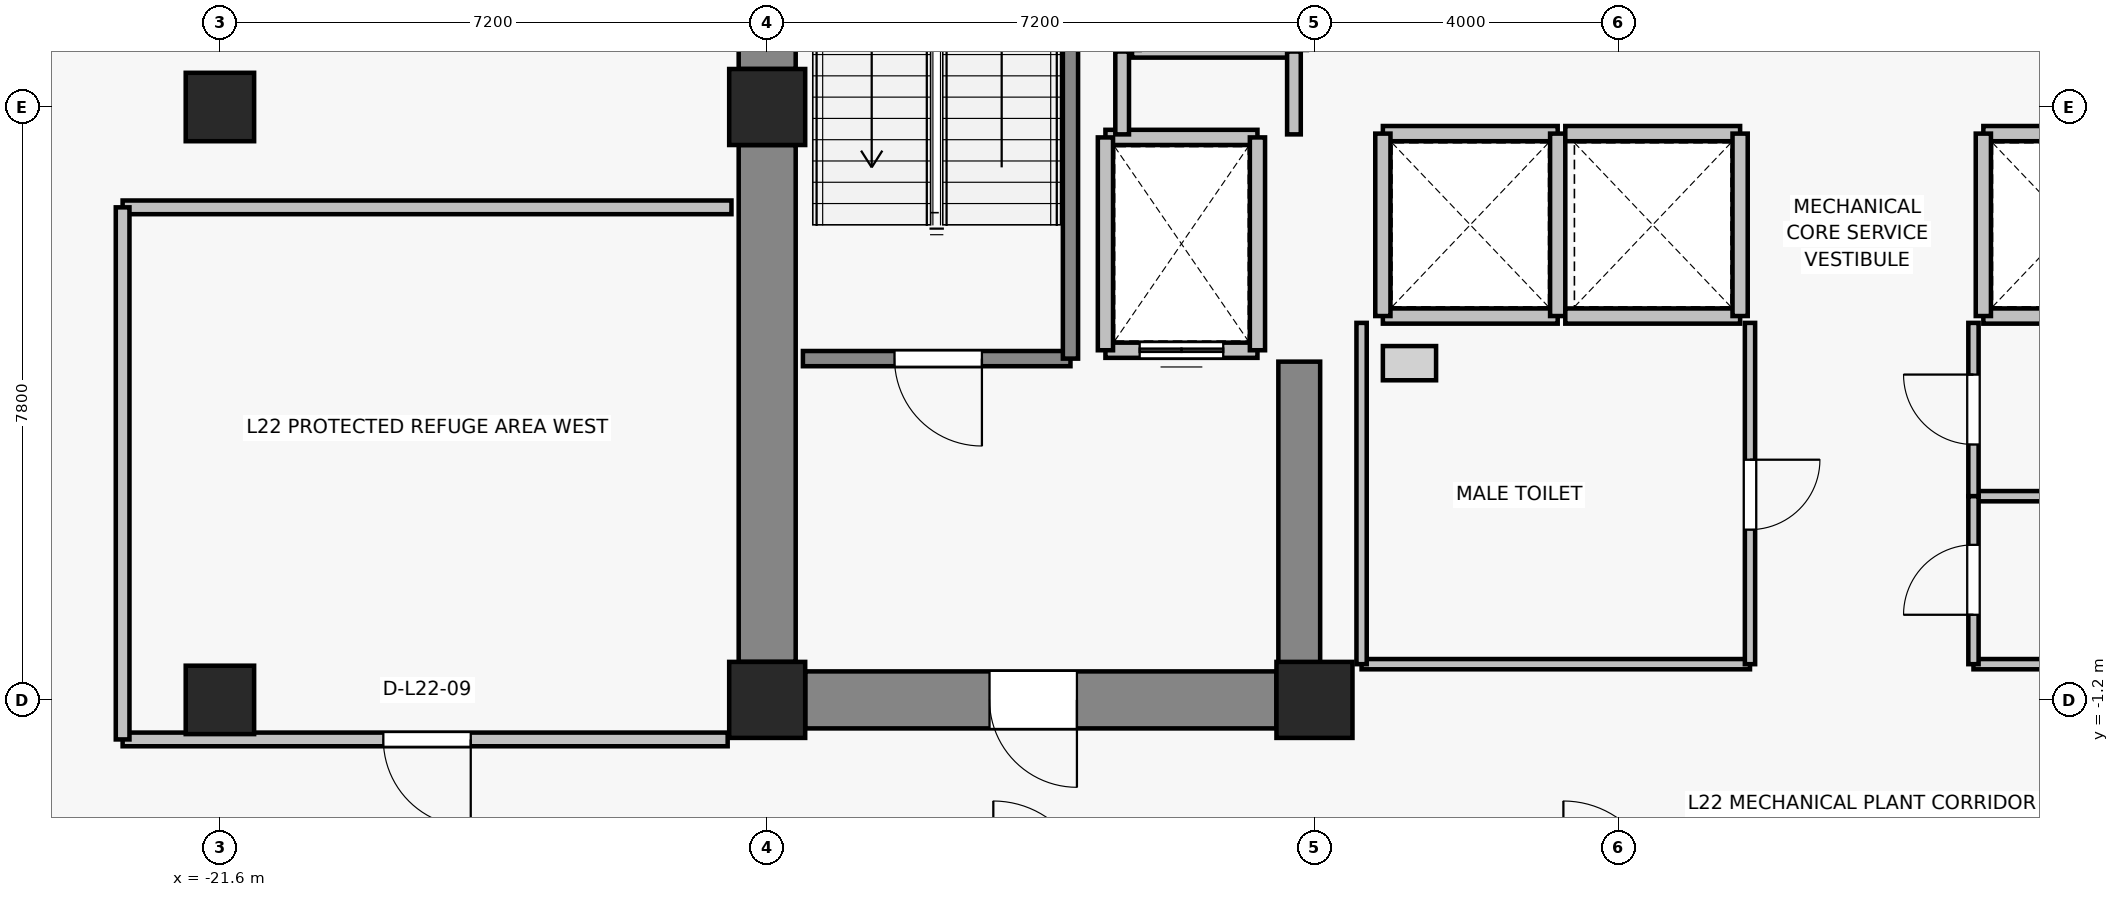
"""IFC4 building model, lengths in metres.
Left out: names, types, materials, properties, quantities, classifications, styles, units other than length and angle.
Written with IfcOpenShell. Run it as: python <this file> out.ifc"""

import sys

from ifc_helpers import new_model, si_unit, direction, frame, frame_2d, origin, origin_2d, place, context, subcontext, project, spatial, rectangle, extrude, source, transform, mapped, element, fill, save


model = new_model("IFC4")
c1 = context("Model", 3, precision=1e-05, world=origin(), true_north=direction((0.0, 1.0)))
c2 = subcontext(c1, "Body", "Model", "MODEL_VIEW")
j1 = project(units=[si_unit("LENGTHUNIT", "METRE"), si_unit("PLANEANGLEUNIT", "RADIAN")], contexts=[c1])
p1 = place(None, origin())
s1 = spatial("IfcSite", under=j1, at=p1, CompositionType="ELEMENT")
p2 = place(p1, origin())
s2 = spatial("IfcBuilding", under=s1, at=p2, CompositionType="ELEMENT")
p3 = place(p2, frame((0.0, 0.0, 80.2)))
s3 = spatial("IfcBuildingStorey", under=s2, at=p3, CompositionType="ELEMENT", Elevation=80.2)
for number, where, z_axis, x_axis in (
    (1, (-14.4, -1.2, 0.0), (0.0, 0.0, 1.0), (1.0, 0.0, 0.0)),
    (2, (-7.2, -1.2, 0.0), (0.0, 0.0, 1.0), (1.0, 0.0, 0.0)),
    (3, (-14.4, 6.6, 0.0), (0.0, 0.0, 1.0), (1.0, 0.0, 0.0)),
):
    element("IfcColumn", number, at=place(p3, frame(where, z_axis=z_axis, x_axis=x_axis)), inside=s3, PredefinedType="COLUMN", context=c2, shape_type="SweptSolid", body=[
        extrude(rectangle(XDim=1.0, YDim=1.0, at=origin_2d()), origin(), (0.0, 0.0, 1.0), 6.6),
    ])
for number, where, z_axis, x_axis in (
    (4, (-21.6, -1.2, 0.0), (0.0, 0.0, 1.0), (1.0, 0.0, 0.0)),
    (5, (-21.6, 6.6, 0.0), (0.0, 0.0, 1.0), (1.0, 0.0, 0.0)),
):
    element("IfcColumn", number, at=place(p3, frame(where, z_axis=z_axis, x_axis=x_axis)), inside=s3, PredefinedType="COLUMN", context=c2, shape_type="SweptSolid", body=[
        extrude(rectangle(XDim=0.9, YDim=0.9, at=origin_2d()), origin(), (0.0, 0.0, 1.0), 6.6),
    ])
p4 = place(p3, frame((-14.4, -0.7, 0.0), z_axis=(0.0, 0.0, 1.0), x_axis=(0.0, 1.0, 0.0)))
e6 = element("IfcWall", 6, at=p4, inside=s3, PredefinedType="SHEAR", context=c2, shape_type="SweptSolid", body=[
    extrude(rectangle(XDim=6.8, YDim=0.75, at=frame_2d((3.4, 0.0))), origin(), (0.0, 0.0, 1.0), 6.35),
])
p5 = place(p3, frame((-14.4, 7.1, 0.0), z_axis=(0.0, 0.0, 1.0), x_axis=(0.0, 1.0, 0.0)))
e7 = element("IfcWall", 7, at=p5, inside=s3, PredefinedType="SHEAR", context=c2, shape_type="SweptSolid", body=[
    extrude(rectangle(XDim=5.9, YDim=0.75, at=frame_2d((2.95, 0.0))), origin(), (0.0, 0.0, 1.0), 6.35),
])
p6 = place(p3, frame((-7.7, -1.2, 0.0), z_axis=(0.0, 0.0, 1.0), x_axis=(-1.0, 0.0, 0.0)))
e8 = element("IfcWall", 8, at=p6, inside=s3, PredefinedType="SHEAR", context=c2, shape_type="SweptSolid", body=[
    extrude(rectangle(XDim=6.2, YDim=0.75, at=frame_2d((3.1, 0.0))), origin(), (0.0, 0.0, 1.0), 6.35),
])
p7 = place(p6, frame((2.625, 0.0, 0.0)))
e9 = element("IfcOpeningElement", 9, at=p7, cuts=e8, PredefinedType="OPENING", context=c2, shape_type="SweptSolid", body=[
    extrude(rectangle(XDim=1.15, YDim=2.15, at=frame_2d((0.575, 1.075))), frame((0.0, 0.385, 0.0), z_axis=(0.0, -1.0, 0.0), x_axis=(1.0, 0.0, 0.0)), (0.0, 0.0, 1.0), 0.77),
])
p8 = place(p3, frame((-7.4, -0.825, 0.0), z_axis=(0.0, 0.0, 1.0), x_axis=(0.0, 1.0, 0.0)))
e10 = element("IfcWall", 10, at=p8, inside=s3, PredefinedType="SHEAR", context=c2, shape_type="SweptSolid", body=[
    extrude(rectangle(XDim=4.075, YDim=0.55, at=frame_2d((2.038, 0.0))), origin(), (0.0, 0.0, 1.0), 6.35),
])
p9 = place(p3, frame((-7.95, 3.4, 0.0), z_axis=(0.0, 0.0, 1.0), x_axis=(-1.0, 0.0, 0.0)))
e11 = element("IfcWall", 11, at=p9, inside=s3, PredefinedType="SOLIDWALL", context=c2, shape_type="SweptSolid", body=[
    extrude(rectangle(XDim=2.0, YDim=0.2, at=frame_2d((1.0, 0.0))), origin(), (0.0, 0.0, 1.0), 6.35),
])
p10 = place(p9, frame((0.45, 0.0, 0.0)))
e12 = element("IfcOpeningElement", 12, at=p10, cuts=e11, PredefinedType="OPENING", context=c2, shape_type="SweptSolid", body=[
    extrude(rectangle(XDim=1.1, YDim=2.2, at=frame_2d((0.55, 1.1))), frame((0.0, 0.11, 0.0), z_axis=(0.0, -1.0, 0.0), x_axis=(1.0, 0.0, 0.0)), (0.0, 0.0, 1.0), 0.22),
])
p11 = place(p3, frame((-9.95, 6.2, 0.0), z_axis=(0.0, 0.0, 1.0), x_axis=(1.0, 0.0, 0.0)))
e13 = element("IfcWall", 13, at=p11, inside=s3, PredefinedType="SOLIDWALL", context=c2, shape_type="SweptSolid", body=[
    extrude(rectangle(XDim=2.0, YDim=0.2, at=frame_2d((1.0, 0.0))), origin(), (0.0, 0.0, 1.0), 6.35),
])
for number, where, z_axis, x_axis in (
    (14, (-9.95, 3.4, 0.0), (0.0, 0.0, 1.0), (0.0, 1.0, 0.0)),
    (15, (-7.95, 6.2, 0.0), (0.0, 0.0, 1.0), (0.0, -1.0, 0.0)),
):
    element("IfcWall", number, at=place(p3, frame(where, z_axis=z_axis, x_axis=x_axis)), inside=s3, PredefinedType="SOLIDWALL", context=c2, shape_type="SweptSolid", body=[
        extrude(rectangle(XDim=2.8, YDim=0.2, at=frame_2d((1.4, 0.0))), origin(), (0.0, 0.0, 1.0), 6.35),
    ])
for number, where, z_axis, x_axis in (
    (16, (-4.0, 3.85, 0.0), (0.0, 0.0, 1.0), (-1.0, 0.0, 0.0)),
    (17, (-6.3, 6.25, 0.0), (0.0, 0.0, 1.0), (1.0, 0.0, 0.0)),
):
    element("IfcWall", number, at=place(p3, frame(where, z_axis=z_axis, x_axis=x_axis)), inside=s3, PredefinedType="SOLIDWALL", context=c2, shape_type="SweptSolid", body=[
        extrude(rectangle(XDim=2.3, YDim=0.2, at=frame_2d((1.15, 0.0))), origin(), (0.0, 0.0, 1.0), 6.35),
    ])
for number, where, z_axis, x_axis in (
    (18, (-6.3, 3.85, 0.0), (0.0, 0.0, 1.0), (0.0, 1.0, 0.0)),
    (19, (-4.0, 6.25, 0.0), (0.0, 0.0, 1.0), (0.0, -1.0, 0.0)),
):
    element("IfcWall", number, at=place(p3, frame(where, z_axis=z_axis, x_axis=x_axis)), inside=s3, PredefinedType="SOLIDWALL", context=c2, shape_type="SweptSolid", body=[
        extrude(rectangle(XDim=2.4, YDim=0.2, at=frame_2d((1.2, 0.0))), origin(), (0.0, 0.0, 1.0), 6.35),
    ])
for number, where, z_axis, x_axis in (
    (20, (-1.6, 3.85, 0.0), (0.0, 0.0, 1.0), (-1.0, 0.0, 0.0)),
    (21, (-3.9, 6.25, 0.0), (0.0, 0.0, 1.0), (1.0, 0.0, 0.0)),
):
    element("IfcWall", number, at=place(p3, frame(where, z_axis=z_axis, x_axis=x_axis)), inside=s3, PredefinedType="SOLIDWALL", context=c2, shape_type="SweptSolid", body=[
        extrude(rectangle(XDim=2.3, YDim=0.2, at=frame_2d((1.15, 0.0))), origin(), (0.0, 0.0, 1.0), 6.35),
    ])
p12 = place(p3, frame((-1.6, 6.25, 0.0), z_axis=(0.0, 0.0, 1.0), x_axis=(0.0, -1.0, 0.0)))
e22 = element("IfcWall", 22, at=p12, inside=s3, PredefinedType="SOLIDWALL", context=c2, shape_type="SweptSolid", body=[
    extrude(rectangle(XDim=2.4, YDim=0.2, at=frame_2d((1.2, 0.0))), origin(), (0.0, 0.0, 1.0), 6.35),
])
for number, where, z_axis, x_axis in (
    (23, (3.9, 3.85, 0.0), (0.0, 0.0, 1.0), (-1.0, 0.0, 0.0)),
    (24, (1.6, 6.25, 0.0), (0.0, 0.0, 1.0), (1.0, 0.0, 0.0)),
):
    element("IfcWall", number, at=place(p3, frame(where, z_axis=z_axis, x_axis=x_axis)), inside=s3, PredefinedType="SOLIDWALL", context=c2, shape_type="SweptSolid", body=[
        extrude(rectangle(XDim=2.3, YDim=0.2, at=frame_2d((1.15, 0.0))), origin(), (0.0, 0.0, 1.0), 6.35),
    ])
p13 = place(p3, frame((1.6, 3.85, 0.0), z_axis=(0.0, 0.0, 1.0), x_axis=(0.0, 1.0, 0.0)))
e25 = element("IfcWall", 25, at=p13, inside=s3, PredefinedType="SOLIDWALL", context=c2, shape_type="SweptSolid", body=[
    extrude(rectangle(XDim=2.4, YDim=0.2, at=frame_2d((1.2, 0.0))), origin(), (0.0, 0.0, 1.0), 6.35),
])
p14 = place(p3, frame((-7.4, 7.35, 0.0), z_axis=(0.0, 0.0, 1.0), x_axis=(-1.0, 0.0, 0.0)))
e26 = element("IfcWall", 26, at=p14, inside=s3, PredefinedType="SOLIDWALL", context=c2, shape_type="SweptSolid", body=[
    extrude(rectangle(XDim=2.2, YDim=0.2, at=frame_2d((1.1, 0.0))), origin(), (0.0, 0.0, 1.0), 5.79),
])
p15 = place(p3, frame((-10.41, 3.29, 0.0), z_axis=(0.0, 0.0, 1.0), x_axis=(-1.0, 0.0, 0.0)))
e27 = element("IfcWall", 27, at=p15, inside=s3, PredefinedType="SOLIDWALL", context=c2, shape_type="SweptSolid", body=[
    extrude(rectangle(XDim=3.52, YDim=0.2, at=frame_2d((1.76, 0.0))), origin(), (0.0, 0.0, 1.0), 6.35),
])
p16 = place(p15, frame((1.165, 0.0, 0.0)))
e28 = element("IfcOpeningElement", 28, at=p16, cuts=e27, PredefinedType="OPENING", context=c2, shape_type="SweptSolid", body=[
    extrude(rectangle(XDim=1.15, YDim=2.15, at=frame_2d((0.575, 1.075))), frame((0.0, 0.11, 0.0), z_axis=(0.0, -1.0, 0.0), x_axis=(1.0, 0.0, 0.0)), (0.0, 0.0, 1.0), 0.22),
])
p17 = place(p3, frame((-10.41, 12.13, 0.0), z_axis=(0.0, 0.0, 1.0), x_axis=(0.0, -1.0, 0.0)))
e29 = element("IfcWall", 29, at=p17, inside=s3, PredefinedType="SOLIDWALL", context=c2, shape_type="SweptSolid", body=[
    extrude(rectangle(XDim=8.84, YDim=0.2, at=frame_2d((4.42, 0.0))), origin(), (0.0, 0.0, 1.0), 6.35),
])
p18 = place(p3, frame((-9.73, 6.24, 0.0), z_axis=(0.0, 0.0, 1.0), x_axis=(0.0, 1.0, 0.0)))
e30 = element("IfcWall", 30, at=p18, inside=s3, PredefinedType="PARTITIONING", context=c2, shape_type="SweptSolid", body=[
    extrude(rectangle(XDim=1.09, YDim=0.18, at=frame_2d((0.545, 0.0))), origin(), (0.0, 0.0, 1.0), 6.35),
])
p19 = place(p3, frame((-7.47, 7.33, 0.0), z_axis=(0.0, 0.0, 1.0), x_axis=(0.0, -1.0, 0.0)))
e31 = element("IfcWall", 31, at=p19, inside=s3, PredefinedType="PARTITIONING", context=c2, shape_type="SweptSolid", body=[
    extrude(rectangle(XDim=1.09, YDim=0.18, at=frame_2d((0.545, 0.0))), origin(), (0.0, 0.0, 1.0), 5.79),
])
p20 = place(p3, frame((-1.47, -0.73, 0.0), z_axis=(0.0, 0.0, 1.0), x_axis=(-1.0, 0.0, 0.0)))
e32 = element("IfcWall", 32, at=p20, inside=s3, PredefinedType="PARTITIONING", context=c2, shape_type="SweptSolid", body=[
    extrude(rectangle(XDim=5.11, YDim=0.135, at=frame_2d((2.555, 0.0))), origin(), (0.0, 0.0, 1.0), 6.35),
])
p21 = place(p3, frame((-6.58, -0.73, 0.0), z_axis=(0.0, 0.0, 1.0), x_axis=(0.0, 1.0, 0.0)))
e33 = element("IfcWall", 33, at=p21, inside=s3, PredefinedType="PARTITIONING", context=c2, shape_type="SweptSolid", body=[
    extrude(rectangle(XDim=4.49, YDim=0.135, at=frame_2d((2.245, 0.0))), origin(), (0.0, 0.0, 1.0), 6.35),
])
p22 = place(p3, frame((-1.47, 3.76, 0.0), z_axis=(0.0, 0.0, 1.0), x_axis=(0.0, -1.0, 0.0)))
e34 = element("IfcWall", 34, at=p22, inside=s3, PredefinedType="PARTITIONING", context=c2, shape_type="SweptSolid", body=[
    extrude(rectangle(XDim=4.49, YDim=0.135, at=frame_2d((2.245, 0.0))), origin(), (0.0, 0.0, 1.0), 6.35),
])
p23 = place(p22, frame((1.8, 0.0, 0.0)))
e35 = element("IfcOpeningElement", 35, at=p23, cuts=e34, PredefinedType="OPENING", context=c2, shape_type="SweptSolid", body=[
    extrude(rectangle(XDim=0.92, YDim=2.1, at=frame_2d((0.46, 1.05))), frame((0.0, 0.077, 0.0), z_axis=(0.0, -1.0, 0.0), x_axis=(1.0, 0.0, 0.0)), (0.0, 0.0, 1.0), 0.155),
])
p24 = place(p3, frame((6.58, 1.48, 0.0), z_axis=(0.0, 0.0, 1.0), x_axis=(-1.0, 0.0, 0.0)))
e36 = element("IfcWall", 36, at=p24, inside=s3, PredefinedType="PARTITIONING", context=c2, shape_type="SweptSolid", body=[
    extrude(rectangle(XDim=5.11, YDim=0.135, at=frame_2d((2.555, 0.0))), origin(), (0.0, 0.0, 1.0), 6.35),
])
p25 = place(p3, frame((1.47, 1.48, 0.0), z_axis=(0.0, 0.0, 1.0), x_axis=(0.0, 1.0, 0.0)))
e37 = element("IfcWall", 37, at=p25, inside=s3, PredefinedType="PARTITIONING", context=c2, shape_type="SweptSolid", body=[
    extrude(rectangle(XDim=2.28, YDim=0.135, at=frame_2d((1.14, 0.0))), origin(), (0.0, 0.0, 1.0), 6.35),
])
p26 = place(p25, frame((0.68, 0.0, 0.0)))
e38 = element("IfcOpeningElement", 38, at=p26, cuts=e37, PredefinedType="OPENING", context=c2, shape_type="SweptSolid", body=[
    extrude(rectangle(XDim=0.92, YDim=2.1, at=frame_2d((0.46, 1.05))), frame((0.0, 0.077, 0.0), z_axis=(0.0, -1.0, 0.0), x_axis=(1.0, 0.0, 0.0)), (0.0, 0.0, 1.0), 0.155),
])
p27 = place(p3, frame((4.18, -0.73, 0.0), z_axis=(0.0, 0.0, 1.0), x_axis=(-1.0, 0.0, 0.0)))
e39 = element("IfcWall", 39, at=p27, inside=s3, PredefinedType="PARTITIONING", context=c2, shape_type="SweptSolid", body=[
    extrude(rectangle(XDim=2.71, YDim=0.135, at=frame_2d((1.355, 0.0))), origin(), (0.0, 0.0, 1.0), 6.35),
])
p28 = place(p3, frame((1.47, -0.73, 0.0), z_axis=(0.0, 0.0, 1.0), x_axis=(0.0, 1.0, 0.0)))
e40 = element("IfcWall", 40, at=p28, inside=s3, PredefinedType="PARTITIONING", context=c2, shape_type="SweptSolid", body=[
    extrude(rectangle(XDim=2.21, YDim=0.135, at=frame_2d((1.105, 0.0))), origin(), (0.0, 0.0, 1.0), 6.35),
])
p29 = place(p28, frame((0.65, 0.0, 0.0)))
e41 = element("IfcOpeningElement", 41, at=p29, cuts=e40, PredefinedType="OPENING", context=c2, shape_type="SweptSolid", body=[
    extrude(rectangle(XDim=0.92, YDim=2.1, at=frame_2d((0.46, 1.05))), frame((0.0, 0.077, 0.0), z_axis=(0.0, -1.0, 0.0), x_axis=(1.0, 0.0, 0.0)), (0.0, 0.0, 1.0), 0.155),
])
p30 = place(p3, frame((-14.92, -1.72, 0.0), z_axis=(0.0, 0.0, 1.0), x_axis=(-1.0, 0.0, 0.0)))
e42 = element("IfcWall", 42, at=p30, inside=s3, PredefinedType="PARTITIONING", context=c2, shape_type="SweptSolid", body=[
    extrude(rectangle(XDim=7.96, YDim=0.18, at=frame_2d((3.98, 0.0))), origin(), (0.0, 0.0, 1.0), 5.79),
])
p31 = place(p30, frame((3.38, 0.0, 0.0)))
e43 = element("IfcOpeningElement", 43, at=p31, cuts=e42, PredefinedType="OPENING", context=c2, shape_type="SweptSolid", body=[
    extrude(rectangle(XDim=1.15, YDim=2.15, at=frame_2d((0.575, 1.075))), frame((0.0, 0.1, 0.0), z_axis=(0.0, -1.0, 0.0), x_axis=(1.0, 0.0, 0.0)), (0.0, 0.0, 1.0), 0.2),
])
p32 = place(p3, frame((-22.88, 5.28, 0.0), z_axis=(0.0, 0.0, 1.0), x_axis=(1.0, 0.0, 0.0)))
e44 = element("IfcWall", 44, at=p32, inside=s3, PredefinedType="PARTITIONING", context=c2, shape_type="SweptSolid", body=[
    extrude(rectangle(XDim=8.01, YDim=0.18, at=frame_2d((4.005, 0.0))), origin(), (0.0, 0.0, 1.0), 5.79),
])
p33 = place(p3, frame((-22.88, -1.72, 0.0), z_axis=(0.0, 0.0, 1.0), x_axis=(0.0, 1.0, 0.0)))
e45 = element("IfcWall", 45, at=p33, inside=s3, PredefinedType="PARTITIONING", context=c2, shape_type="SweptSolid", body=[
    extrude(rectangle(XDim=7.0, YDim=0.18, at=frame_2d((3.5, 0.0))), origin(), (0.0, 0.0, 1.0), 5.332),
])
m1 = source(origin(), c2, "Body", "SweptSolid", [
    extrude(rectangle(XDim=1.1, YDim=2.2, at=frame_2d((0.55, 1.1))), frame((0.0, 0.025, 0.0), z_axis=(0.0, -1.0, 0.0), x_axis=(1.0, 0.0, 0.0)), (0.0, 0.0, 1.0), 0.05),
])
p34 = place(p10, origin())
e46 = element("IfcDoor", 46, at=p34, inside=s3, OperationType="DOUBLE_DOOR_SLIDING", PredefinedType="DOOR", context=c2, shape_type="MappedRepresentation", body=[
    mapped(m1, transform((0.0, 0.0, 0.0), x_axis=(1.0, 0.0, 0.0), y_axis=(0.0, 1.0, 0.0), z_axis=(0.0, 0.0, 1.0), scale=1.0)),
])
fill(e12, e46)
m2 = source(origin(), c2, "Body", "SweptSolid", [
    extrude(rectangle(XDim=1.15, YDim=2.15, at=frame_2d((0.575, 1.075))), frame((0.0, 0.025, 0.0), z_axis=(0.0, -1.0, 0.0), x_axis=(1.0, 0.0, 0.0)), (0.0, 0.0, 1.0), 0.05),
])
p35 = place(p16, origin())
e47 = element("IfcDoor", 47, at=p35, inside=s3, OperationType="SINGLE_SWING_LEFT", PredefinedType="DOOR", context=c2, shape_type="MappedRepresentation", body=[
    mapped(m2, transform((0.0, 0.0, 0.0), x_axis=(1.0, 0.0, 0.0), y_axis=(0.0, 1.0, 0.0), z_axis=(0.0, 0.0, 1.0), scale=1.0)),
])
fill(e28, e47)
p36 = place(p7, origin())
e48 = element("IfcDoor", 48, at=p36, inside=s3, OperationType="SINGLE_SWING_LEFT", PredefinedType="DOOR", context=c2, shape_type="MappedRepresentation", body=[
    mapped(m2, transform((0.0, 0.0, 0.0), x_axis=(1.0, 0.0, 0.0), y_axis=(0.0, 1.0, 0.0), z_axis=(0.0, 0.0, 1.0), scale=1.0)),
])
fill(e9, e48)
m3 = source(origin(), c2, "Body", "SweptSolid", [
    extrude(rectangle(XDim=0.92, YDim=2.1, at=frame_2d((0.46, 1.05))), frame((0.0, 0.025, 0.0), z_axis=(0.0, -1.0, 0.0), x_axis=(1.0, 0.0, 0.0)), (0.0, 0.0, 1.0), 0.05),
])
p37 = place(p23, origin())
e49 = element("IfcDoor", 49, at=p37, inside=s3, OperationType="SINGLE_SWING_LEFT", PredefinedType="DOOR", context=c2, shape_type="MappedRepresentation", body=[
    mapped(m3, transform((0.0, 0.0, 0.0), x_axis=(1.0, 0.0, 0.0), y_axis=(0.0, 1.0, 0.0), z_axis=(0.0, 0.0, 1.0), scale=1.0)),
])
fill(e35, e49)
p38 = place(p26, origin())
e50 = element("IfcDoor", 50, at=p38, inside=s3, OperationType="SINGLE_SWING_RIGHT", PredefinedType="DOOR", context=c2, shape_type="MappedRepresentation", body=[
    mapped(m3, transform((0.0, 0.0, 0.0), x_axis=(1.0, 0.0, 0.0), y_axis=(0.0, 1.0, 0.0), z_axis=(0.0, 0.0, 1.0), scale=1.0)),
])
fill(e38, e50)
p39 = place(p29, origin())
e51 = element("IfcDoor", 51, at=p39, inside=s3, OperationType="SINGLE_SWING_LEFT", PredefinedType="DOOR", context=c2, shape_type="MappedRepresentation", body=[
    mapped(m3, transform((0.0, 0.0, 0.0), x_axis=(1.0, 0.0, 0.0), y_axis=(0.0, 1.0, 0.0), z_axis=(0.0, 0.0, 1.0), scale=1.0)),
])
fill(e41, e51)
p40 = place(p31, origin())
e52 = element("IfcDoor", 52, at=p40, inside=s3, OperationType="SINGLE_SWING_LEFT", PredefinedType="DOOR", context=c2, shape_type="MappedRepresentation", body=[
    mapped(m2, transform((0.0, 0.0, 0.0), x_axis=(1.0, 0.0, 0.0), y_axis=(0.0, 1.0, 0.0), z_axis=(0.0, 0.0, 1.0), scale=1.0)),
])
fill(e43, e52)
save(model, sys.argv[1])
